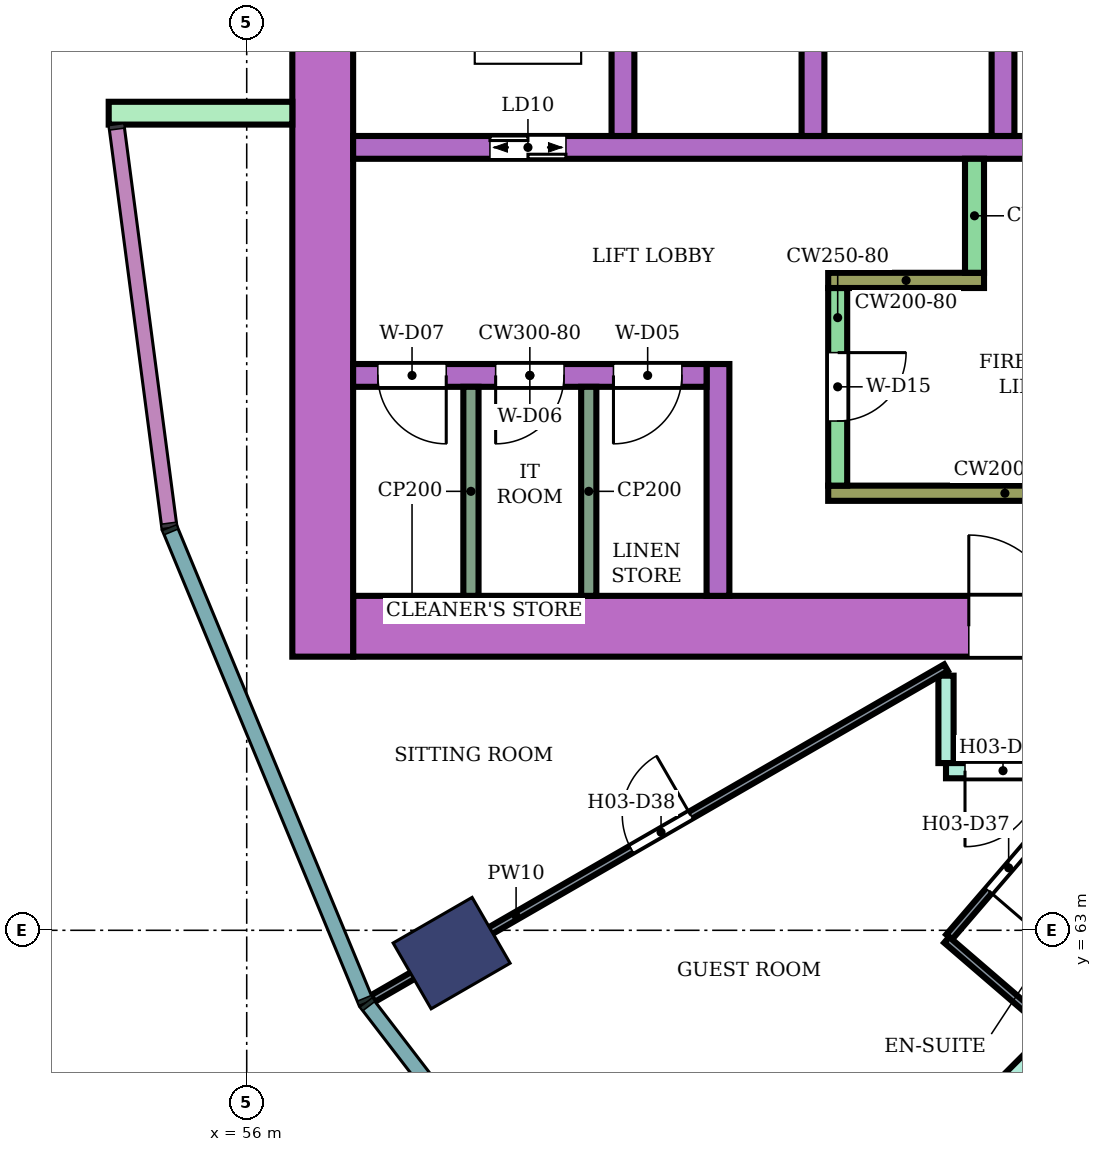
"""IFC4 building model, lengths in metres.
Left out: names, types, materials, properties, quantities, classifications, styles, units other than length and angle.
Written with IfcOpenShell. Run it as: python <this file> out.ifc"""

import sys

from ifc_helpers import new_model, si_unit, direction, frame, frame_2d, origin, origin_2d, place, context, subcontext, project, spatial, rectangle, extrude, element, fill, save


model = new_model("IFC4")
c1 = context("Model", 3, precision=1e-05, world=origin(), true_north=direction((0.0, 1.0)))
c2 = subcontext(c1, "Body", "Model", "MODEL_VIEW")
j1 = project(units=[si_unit("LENGTHUNIT", "METRE"), si_unit("PLANEANGLEUNIT", "RADIAN")], contexts=[c1])
p1 = place(None, origin())
s1 = spatial("IfcSite", under=j1, at=p1, CompositionType="ELEMENT")
p2 = place(p1, origin())
s2 = spatial("IfcBuilding", under=s1, at=p2, CompositionType="ELEMENT")
p3 = place(p2, frame((0.0, 0.0, 55.4)))
s3 = spatial("IfcBuildingStorey", under=s2, at=p3, CompositionType="ELEMENT", Elevation=55.4)
p4 = place(p3, frame((58.696, 62.7, 0.0), z_axis=(0.0, 0.0, 1.0), x_axis=(-0.866025403784, -0.5, 0.0)))
e1 = element("IfcColumn", 1, at=p4, inside=s3, PredefinedType="COLUMN", context=c2, shape_type="SweptSolid", body=[
    extrude(rectangle(XDim=1.2, YDim=1.0, at=origin_2d()), origin(), (0.0, 0.0, 1.0), 3.8),
])
p5 = place(p3, frame((72.1, 67.0, 0.0), z_axis=(0.0, 0.0, 1.0), x_axis=(-1.0, 0.0, 0.0)))
e2 = element("IfcWall", 2, at=p5, inside=s3, PredefinedType="SHEAR", context=c2, shape_type="SweptSolid", body=[
    extrude(rectangle(XDim=14.7, YDim=0.8, at=frame_2d((7.35, 0.0))), origin(), (0.0, 0.0, 1.0), 3.48),
])
p6 = place(p5, frame((4.2, 0.0, 0.0)))
e3 = element("IfcOpeningElement", 3, at=p6, cuts=e2, PredefinedType="OPENING", context=c2, shape_type="SweptSolid", body=[
    extrude(rectangle(XDim=2.4, YDim=2.4, at=frame_2d((1.2, 1.2))), frame((0.0, 0.41, 0.0), z_axis=(0.0, -1.0, 0.0), x_axis=(1.0, 0.0, 0.0)), (0.0, 0.0, 1.0), 0.82),
])
p7 = place(p3, frame((57.0, 83.4, 0.0), z_axis=(0.0, 0.0, 1.0), x_axis=(0.0, -1.0, 0.0)))
e4 = element("IfcWall", 4, at=p7, inside=s3, PredefinedType="SHEAR", context=c2, shape_type="SweptSolid", body=[
    extrude(rectangle(XDim=16.8, YDim=0.8, at=frame_2d((8.4, 0.0))), origin(), (0.0, 0.0, 1.0), 3.48),
])
p8 = place(p3, frame((68.3, 73.3, 0.0), z_axis=(0.0, 0.0, 1.0), x_axis=(-1.0, 0.0, 0.0)))
e5 = element("IfcWall", 5, at=p8, inside=s3, PredefinedType="SHEAR", context=c2, shape_type="SweptSolid", body=[
    extrude(rectangle(XDim=10.9, YDim=0.3, at=frame_2d((5.45, 0.0))), origin(), (0.0, 0.0, 1.0), 3.48),
])
p9 = place(p8, frame((0.55, 0.0, 0.0)))
e6 = element("IfcOpeningElement", 6, at=p9, cuts=e5, PredefinedType="OPENING", context=c2, shape_type="SweptSolid", body=[
    extrude(rectangle(XDim=1.1, YDim=2.1, at=frame_2d((0.55, 1.05))), frame((0.0, 0.16, 0.0), z_axis=(0.0, -1.0, 0.0), x_axis=(1.0, 0.0, 0.0)), (0.0, 0.0, 1.0), 0.32),
])
p10 = place(p8, frame((8.1, 0.0, 0.0)))
e7 = element("IfcOpeningElement", 7, at=p10, cuts=e5, PredefinedType="OPENING", context=c2, shape_type="SweptSolid", body=[
    extrude(rectangle(XDim=1.0, YDim=2.1, at=frame_2d((0.5, 1.05))), frame((0.0, 0.16, 0.0), z_axis=(0.0, -1.0, 0.0), x_axis=(1.0, 0.0, 0.0)), (0.0, 0.0, 1.0), 0.32),
])
for number, where, z_axis, x_axis in (
    (8, (65.95, 76.0, 0.0), (0.0, 0.0, 1.0), (0.0, -1.0, 0.0)),
    (9, (63.45, 76.0, 0.0), (0.0, 0.0, 1.0), (0.0, -1.0, 0.0)),
    (10, (60.95, 76.0, 0.0), (0.0, 0.0, 1.0), (0.0, -1.0, 0.0)),
):
    element("IfcWall", number, at=place(p3, frame(where, z_axis=z_axis, x_axis=x_axis)), inside=s3, PredefinedType="SHEAR", context=c2, shape_type="SweptSolid", body=[
        extrude(rectangle(XDim=2.55, YDim=0.3, at=frame_2d((1.275, 0.0))), origin(), (0.0, 0.0, 1.0), 3.48),
    ])
p11 = place(p3, frame((68.3, 68.75, 0.0), z_axis=(0.0, 0.0, 1.0), x_axis=(-1.0, 0.0, 0.0)))
e11 = element("IfcWall", 11, at=p11, inside=s3, PredefinedType="SHEAR", context=c2, shape_type="SweptSolid", body=[
    extrude(rectangle(XDim=4.65, YDim=0.2, at=frame_2d((2.325, 0.0))), origin(), (0.0, 0.0, 1.0), 3.48),
])
p12 = place(p3, frame((63.775, 71.45, 0.0), z_axis=(0.0, 0.0, 1.0), x_axis=(0.0, -1.0, 0.0)))
e12 = element("IfcWall", 12, at=p12, inside=s3, PredefinedType="SHEAR", context=c2, shape_type="SweptSolid", body=[
    extrude(rectangle(XDim=2.6, YDim=0.25, at=frame_2d((1.3, 0.0))), origin(), (0.0, 0.0, 1.0), 3.48),
])
p13 = place(p12, frame((0.85, 0.0, 0.0)))
e13 = element("IfcOpeningElement", 13, at=p13, cuts=e12, PredefinedType="OPENING", context=c2, shape_type="SweptSolid", body=[
    extrude(rectangle(XDim=0.9, YDim=2.1, at=frame_2d((0.45, 1.05))), frame((0.0, 0.135, 0.0), z_axis=(0.0, -1.0, 0.0), x_axis=(1.0, 0.0, 0.0)), (0.0, 0.0, 1.0), 0.27),
])
p14 = place(p3, frame((65.7, 71.55, 0.0), z_axis=(0.0, 0.0, 1.0), x_axis=(-1.0, 0.0, 0.0)))
e14 = element("IfcWall", 14, at=p14, inside=s3, PredefinedType="SHEAR", context=c2, shape_type="SweptSolid", body=[
    extrude(rectangle(XDim=2.05, YDim=0.2, at=frame_2d((1.025, 0.0))), origin(), (0.0, 0.0, 1.0), 3.48),
])
p15 = place(p3, frame((65.575, 73.15, 0.0), z_axis=(0.0, 0.0, 1.0), x_axis=(0.0, -1.0, 0.0)))
e15 = element("IfcWall", 15, at=p15, inside=s3, PredefinedType="SHEAR", context=c2, shape_type="SweptSolid", body=[
    extrude(rectangle(XDim=1.5, YDim=0.25, at=frame_2d((0.75, 0.0))), origin(), (0.0, 0.0, 1.0), 3.48),
])
p16 = place(p3, frame((62.2, 70.45, 0.0), z_axis=(0.0, 0.0, 1.0), x_axis=(0.0, -1.0, 0.0)))
e16 = element("IfcWall", 16, at=p16, inside=s3, PredefinedType="SHEAR", context=c2, shape_type="SweptSolid", body=[
    extrude(rectangle(XDim=3.05, YDim=0.3, at=frame_2d((1.525, 0.0))), origin(), (0.0, 0.0, 1.0), 3.48),
])
p17 = place(p3, frame((62.05, 70.3, 0.0), z_axis=(0.0, 0.0, 1.0), x_axis=(-1.0, 0.0, 0.0)))
e17 = element("IfcWall", 17, at=p17, inside=s3, PredefinedType="SHEAR", context=c2, shape_type="SweptSolid", body=[
    extrude(rectangle(XDim=4.65, YDim=0.3, at=frame_2d((2.325, 0.0))), origin(), (0.0, 0.0, 1.0), 3.48),
])
p18 = place(p17, frame((0.325, 0.0, 0.0)))
e18 = element("IfcOpeningElement", 18, at=p18, cuts=e17, PredefinedType="OPENING", context=c2, shape_type="SweptSolid", body=[
    extrude(rectangle(XDim=0.9, YDim=2.1, at=frame_2d((0.45, 1.05))), frame((0.0, 0.16, 0.0), z_axis=(0.0, -1.0, 0.0), x_axis=(1.0, 0.0, 0.0)), (0.0, 0.0, 1.0), 0.32),
])
p19 = place(p17, frame((1.875, 0.0, 0.0)))
e19 = element("IfcOpeningElement", 19, at=p19, cuts=e17, PredefinedType="OPENING", context=c2, shape_type="SweptSolid", body=[
    extrude(rectangle(XDim=0.9, YDim=2.1, at=frame_2d((0.45, 1.05))), frame((0.0, 0.16, 0.0), z_axis=(0.0, -1.0, 0.0), x_axis=(1.0, 0.0, 0.0)), (0.0, 0.0, 1.0), 0.32),
])
p20 = place(p17, frame((3.425, 0.0, 0.0)))
e20 = element("IfcOpeningElement", 20, at=p20, cuts=e17, PredefinedType="OPENING", context=c2, shape_type="SweptSolid", body=[
    extrude(rectangle(XDim=0.9, YDim=2.1, at=frame_2d((0.45, 1.05))), frame((0.0, 0.16, 0.0), z_axis=(0.0, -1.0, 0.0), x_axis=(1.0, 0.0, 0.0)), (0.0, 0.0, 1.0), 0.32),
])
p21 = place(p3, frame((56.6, 73.75, 0.0), z_axis=(0.0, 0.0, 1.0), x_axis=(-1.0, 0.0, 0.0)))
e21 = element("IfcWall", 21, at=p21, inside=s3, PredefinedType="NOTDEFINED", context=c2, shape_type="SweptSolid", body=[
    extrude(rectangle(XDim=2.416, YDim=0.3, at=frame_2d((1.208, 0.0))), origin(), (0.0, 0.0, 1.0), 3.8),
])
p22 = place(p3, frame((63.596, 58.596, 0.0), z_axis=(0.0, 0.0, 1.0), x_axis=(0.707106781187, 0.707106781187, 0.0)))
e22 = element("IfcWall", 22, at=p22, inside=s3, PredefinedType="PARTITIONING", context=c2, shape_type="SweptSolid", body=[
    extrude(rectangle(XDim=7.005, YDim=0.2, at=frame_2d((3.503, 0.0))), origin(), (0.0, 0.0, 1.0), 3.35),
])
p23 = place(p3, frame((65.2, 65.2, 0.0), z_axis=(0.0, 0.0, 1.0), x_axis=(0.0, 1.0, 0.0)))
e23 = element("IfcWall", 23, at=p23, inside=s3, PredefinedType="PARTITIONING", context=c2, shape_type="SweptSolid", body=[
    extrude(rectangle(XDim=1.15, YDim=0.2, at=frame_2d((0.575, 0.0))), origin(), (0.0, 0.0, 1.0), 3.35),
])
p24 = place(p3, frame((65.2, 65.1, 0.0), z_axis=(0.0, 0.0, 1.0), x_axis=(1.0, 0.0, 0.0)))
e24 = element("IfcWall", 24, at=p24, inside=s3, PredefinedType="PARTITIONING", context=c2, shape_type="SweptSolid", body=[
    extrude(rectangle(XDim=1.665, YDim=0.2, at=frame_2d((0.833, 0.0))), origin(), (0.0, 0.0, 1.0), 3.35),
])
p25 = place(p24, frame((0.25, 0.0, 0.0)))
e25 = element("IfcOpeningElement", 25, at=p25, cuts=e24, PredefinedType="OPENING", context=c2, shape_type="SweptSolid", body=[
    extrude(rectangle(XDim=1.0, YDim=2.1, at=frame_2d((0.5, 1.05))), frame((0.0, 0.11, 0.0), z_axis=(0.0, -1.0, 0.0), x_axis=(1.0, 0.0, 0.0)), (0.0, 0.0, 1.0), 0.22),
])
p26 = place(p3, frame((57.659, 62.101, 0.0), z_axis=(0.0, 0.0, 1.0), x_axis=(0.86602264145, 0.500004784474, 0.0)))
e26 = element("IfcWall", 26, at=p26, inside=s3, PredefinedType="PARTITIONING", context=c2, shape_type="SweptSolid", body=[
    extrude(rectangle(XDim=8.708, YDim=0.1, at=frame_2d((4.354, 0.0))), origin(), (0.0, 0.0, 1.0), 3.35),
])
p27 = place(p26, frame((3.929, 0.0, 0.0)))
e27 = element("IfcOpeningElement", 27, at=p27, cuts=e26, PredefinedType="OPENING", context=c2, shape_type="SweptSolid", body=[
    extrude(rectangle(XDim=0.9, YDim=2.1, at=frame_2d((0.45, 1.05))), frame((0.0, 0.06, 0.0), z_axis=(0.0, -1.0, 0.0), x_axis=(1.0, 0.0, 0.0)), (0.0, 0.0, 1.0), 0.12),
])
p28 = place(p3, frame((65.242, 62.912, 0.0), z_axis=(0.0, 0.0, 1.0), x_axis=(0.652069888227, 0.758158862553, 0.0)))
e28 = element("IfcWall", 28, at=p28, inside=s3, PredefinedType="PARTITIONING", context=c2, shape_type="SweptSolid", body=[
    extrude(rectangle(XDim=2.75, YDim=0.1, at=frame_2d((1.375, 0.0))), origin(), (0.0, 0.0, 1.0), 3.35),
])
p29 = place(p28, frame((0.8, 0.0, 0.0)))
e29 = element("IfcOpeningElement", 29, at=p29, cuts=e28, PredefinedType="OPENING", context=c2, shape_type="SweptSolid", body=[
    extrude(rectangle(XDim=0.8, YDim=2.1, at=frame_2d((0.4, 1.05))), frame((0.0, 0.06, 0.0), z_axis=(0.0, -1.0, 0.0), x_axis=(1.0, 0.0, 0.0)), (0.0, 0.0, 1.0), 0.12),
])
p30 = place(p3, frame((65.209, 62.875, 0.0), z_axis=(0.0, 0.0, 1.0), x_axis=(0.757930378138, -0.652335451969, 0.0)))
e30 = element("IfcWall", 30, at=p30, inside=s3, PredefinedType="PARTITIONING", context=c2, shape_type="SweptSolid", body=[
    extrude(rectangle(XDim=4.15, YDim=0.1, at=frame_2d((2.075, 0.0))), origin(), (0.0, 0.0, 1.0), 3.35),
])
for number, where, z_axis, x_axis in (
    (31, (60.5, 70.15, 0.0), (0.0, 0.0, 1.0), (0.0, -1.0, 0.0)),
    (32, (58.95, 70.15, 0.0), (0.0, 0.0, 1.0), (0.0, -1.0, 0.0)),
):
    element("IfcWall", number, at=place(p3, frame(where, z_axis=z_axis, x_axis=x_axis)), inside=s3, PredefinedType="PARTITIONING", context=c2, shape_type="SweptSolid", body=[
        extrude(rectangle(XDim=2.75, YDim=0.2, at=frame_2d((1.375, 0.0))), origin(), (0.0, 0.0, 1.0), 3.48),
    ])
p31 = place(p25, frame((1.0, 0.0, 0.0), z_axis=(0.0, 0.0, 1.0), x_axis=(-1.0, 0.0, 0.0)))
e33 = element("IfcDoor", 33, at=p31, inside=s3, OperationType="SINGLE_SWING_RIGHT", PredefinedType="DOOR", context=c2, shape_type="SweptSolid", body=[
    extrude(rectangle(XDim=1.0, YDim=2.1, at=frame_2d((0.5, 1.05))), frame((0.0, 0.025, 0.0), z_axis=(0.0, -1.0, 0.0), x_axis=(1.0, 0.0, 0.0)), (0.0, 0.0, 1.0), 0.05),
])
fill(e25, e33)
p32 = place(p29, frame((0.8, 0.0, 0.0), z_axis=(0.0, 0.0, 1.0), x_axis=(-1.0, 0.0, 0.0)))
e34 = element("IfcDoor", 34, at=p32, inside=s3, OperationType="SINGLE_SWING_RIGHT", PredefinedType="DOOR", context=c2, shape_type="SweptSolid", body=[
    extrude(rectangle(XDim=0.8, YDim=2.1, at=frame_2d((0.4, 1.05))), frame((0.0, 0.025, 0.0), z_axis=(0.0, -1.0, 0.0), x_axis=(1.0, 0.0, 0.0)), (0.0, 0.0, 1.0), 0.05),
])
fill(e29, e34)
p33 = place(p27, origin())
e35 = element("IfcDoor", 35, at=p33, inside=s3, OperationType="SINGLE_SWING_RIGHT", PredefinedType="DOOR", context=c2, shape_type="SweptSolid", body=[
    extrude(rectangle(XDim=0.9, YDim=2.1, at=frame_2d((0.45, 1.05))), frame((0.0, 0.025, 0.0), z_axis=(0.0, -1.0, 0.0), x_axis=(1.0, 0.0, 0.0)), (0.0, 0.0, 1.0), 0.05),
])
fill(e27, e35)
p34 = place(p10, origin())
e36 = element("IfcDoor", 36, at=p34, inside=s3, OperationType="DOUBLE_DOOR_SLIDING", PredefinedType="DOOR", context=c2, shape_type="SweptSolid", body=[
    extrude(rectangle(XDim=1.0, YDim=2.1, at=frame_2d((0.5, 1.05))), frame((0.0, 0.025, 0.0), z_axis=(0.0, -1.0, 0.0), x_axis=(1.0, 0.0, 0.0)), (0.0, 0.0, 1.0), 0.05),
])
fill(e7, e36)
p35 = place(p13, origin())
e37 = element("IfcDoor", 37, at=p35, inside=s3, OperationType="SINGLE_SWING_LEFT", PredefinedType="DOOR", context=c2, shape_type="SweptSolid", body=[
    extrude(rectangle(XDim=0.9, YDim=2.1, at=frame_2d((0.45, 1.05))), frame((0.0, 0.025, 0.0), z_axis=(0.0, -1.0, 0.0), x_axis=(1.0, 0.0, 0.0)), (0.0, 0.0, 1.0), 0.05),
])
fill(e13, e37)
p36 = place(p18, origin())
e38 = element("IfcDoor", 38, at=p36, inside=s3, OperationType="SINGLE_SWING_RIGHT", PredefinedType="DOOR", context=c2, shape_type="SweptSolid", body=[
    extrude(rectangle(XDim=0.9, YDim=2.1, at=frame_2d((0.45, 1.05))), frame((0.0, 0.025, 0.0), z_axis=(0.0, -1.0, 0.0), x_axis=(1.0, 0.0, 0.0)), (0.0, 0.0, 1.0), 0.05),
])
fill(e18, e38)
p37 = place(p19, origin())
e39 = element("IfcDoor", 39, at=p37, inside=s3, OperationType="SINGLE_SWING_RIGHT", PredefinedType="DOOR", context=c2, shape_type="SweptSolid", body=[
    extrude(rectangle(XDim=0.9, YDim=2.1, at=frame_2d((0.45, 1.05))), frame((0.0, 0.025, 0.0), z_axis=(0.0, -1.0, 0.0), x_axis=(1.0, 0.0, 0.0)), (0.0, 0.0, 1.0), 0.05),
])
fill(e19, e39)
p38 = place(p20, origin())
e40 = element("IfcDoor", 40, at=p38, inside=s3, OperationType="SINGLE_SWING_LEFT", PredefinedType="DOOR", context=c2, shape_type="SweptSolid", body=[
    extrude(rectangle(XDim=0.9, YDim=2.1, at=frame_2d((0.45, 1.05))), frame((0.0, 0.025, 0.0), z_axis=(0.0, -1.0, 0.0), x_axis=(1.0, 0.0, 0.0)), (0.0, 0.0, 1.0), 0.05),
])
fill(e20, e40)
p39 = place(p6, frame((2.4, 0.0, 0.0), z_axis=(0.0, 0.0, 1.0), x_axis=(-1.0, 0.0, 0.0)))
e41 = element("IfcDoor", 41, at=p39, inside=s3, OperationType="DOUBLE_DOOR_SINGLE_SWING", PredefinedType="DOOR", context=c2, shape_type="SweptSolid", body=[
    extrude(rectangle(XDim=2.4, YDim=2.4, at=frame_2d((1.2, 1.2))), frame((0.0, 0.025, 0.0), z_axis=(0.0, -1.0, 0.0), x_axis=(1.0, 0.0, 0.0)), (0.0, 0.0, 1.0), 0.05),
])
fill(e3, e41)
save(model, sys.argv[1])
